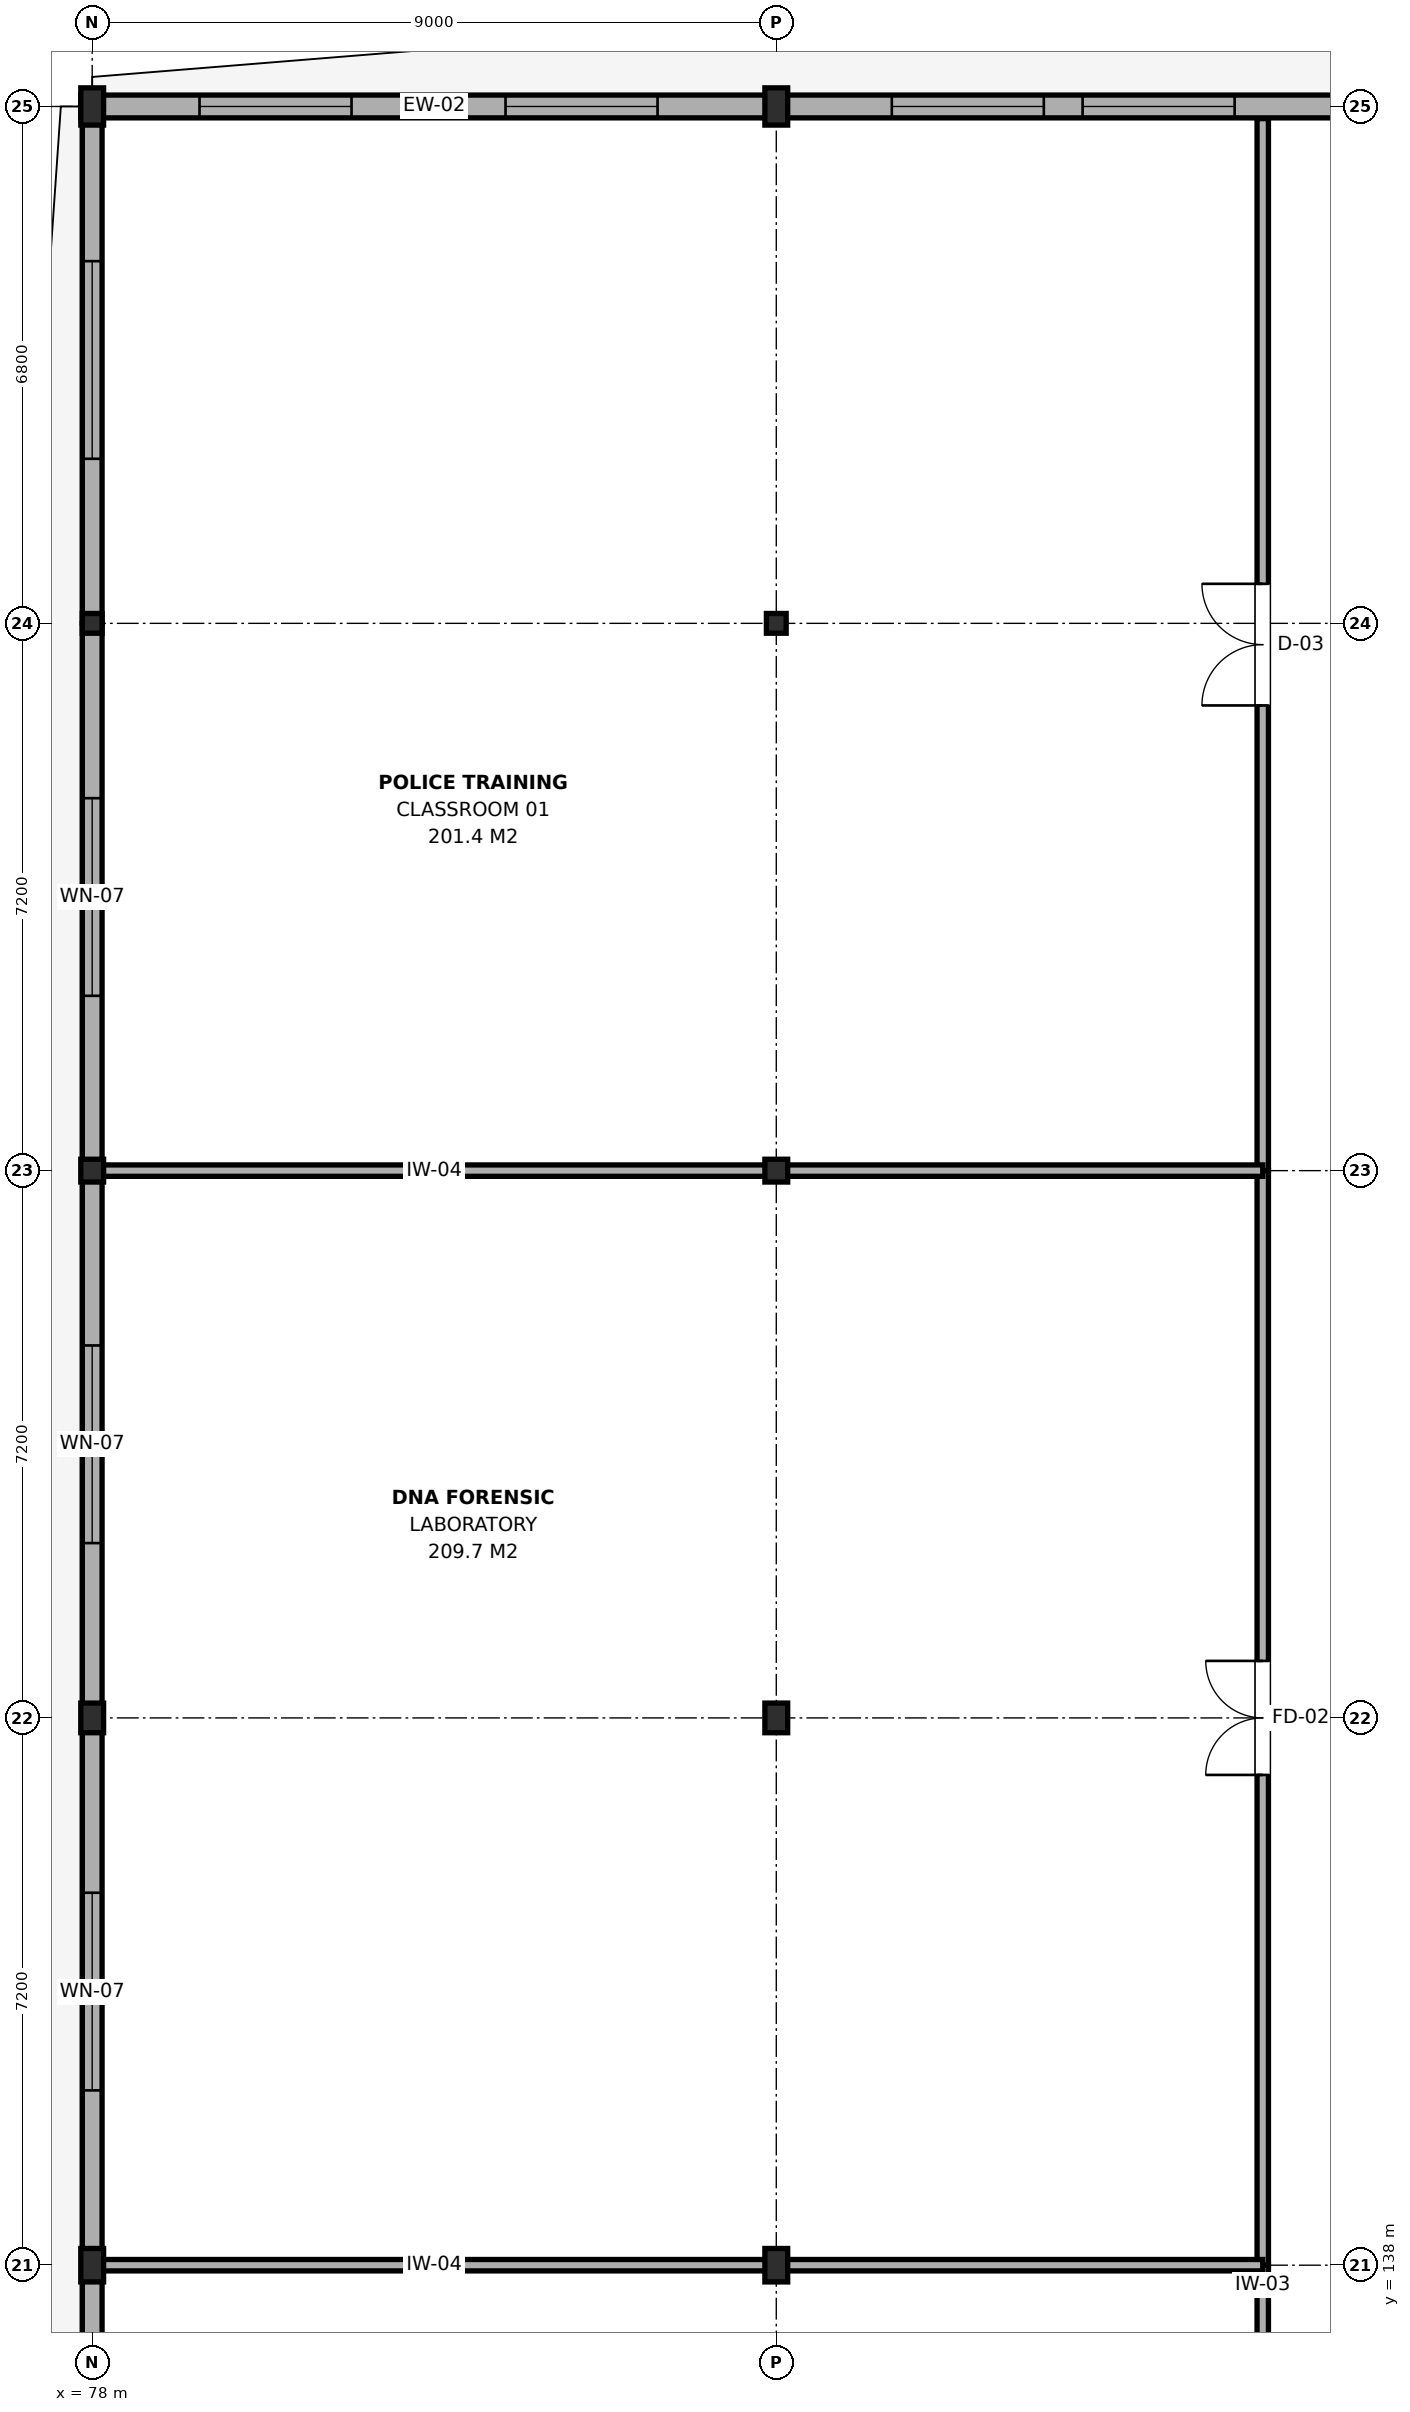
"""IFC4 building model, lengths in metres.
Left out: names, types, materials, properties, quantities, classifications, styles, units other than length and angle.
Written with IfcOpenShell. Run it as: python <this file> out.ifc"""

import sys

from ifc_helpers import new_model, si_unit, direction, frame, frame_2d, origin, origin_2d, place, context, subcontext, project, spatial, rectangle, i_section, extrude, element, fill, save


model = new_model("IFC4")
c1 = context("Model", 3, precision=1e-05, world=origin(), true_north=direction((0.0, 1.0)))
c2 = subcontext(c1, "Body", "Model", "MODEL_VIEW")
j1 = project(units=[si_unit("LENGTHUNIT", "METRE"), si_unit("PLANEANGLEUNIT", "RADIAN")], contexts=[c1])
p1 = place(None, origin())
s1 = spatial("IfcSite", under=j1, at=p1, CompositionType="ELEMENT")
p2 = place(p1, origin())
s2 = spatial("IfcBuilding", under=s1, at=p2, CompositionType="ELEMENT")
p3 = place(p2, frame((0.0, 0.0, 13.2)))
s3 = spatial("IfcBuildingStorey", under=s2, at=p3, CompositionType="ELEMENT", Elevation=13.2)
p4 = place(p3, frame((78.0, 138.0, 0.0), z_axis=(0.0, 0.0, 1.0), x_axis=(1.0, 0.0, 0.0)))
e1 = element("IfcColumn", 1, at=p4, inside=s3, PredefinedType="COLUMN", context=c2, shape_type="SweptSolid", body=[
    extrude(i_section(OverallWidth=0.3, OverallDepth=0.44, WebThickness=0.011, FlangeThickness=0.021, FilletRadius=0.027, at=origin_2d()), origin(), (0.0, 0.0, 1.0), 3.9),
])
p5 = place(p3, frame((78.0, 145.2, 0.0), z_axis=(0.0, 0.0, 1.0), x_axis=(1.0, 0.0, 0.0)))
e2 = element("IfcColumn", 2, at=p5, inside=s3, PredefinedType="COLUMN", context=c2, shape_type="SweptSolid", body=[
    extrude(i_section(OverallWidth=0.3, OverallDepth=0.39, WebThickness=0.011, FlangeThickness=0.019, FilletRadius=0.027, at=origin_2d()), origin(), (0.0, 0.0, 1.0), 3.9),
])
p6 = place(p3, frame((78.0, 152.4, 0.0), z_axis=(0.0, 0.0, 1.0), x_axis=(1.0, 0.0, 0.0)))
e3 = element("IfcColumn", 3, at=p6, inside=s3, PredefinedType="COLUMN", context=c2, shape_type="SweptSolid", body=[
    extrude(i_section(OverallWidth=0.3, OverallDepth=0.3, WebThickness=0.011, FlangeThickness=0.019, FilletRadius=0.027, at=origin_2d()), origin(), (0.0, 0.0, 1.0), 3.9),
])
p7 = place(p3, frame((78.0, 159.6, 0.0), z_axis=(0.0, 0.0, 1.0), x_axis=(1.0, 0.0, 0.0)))
e4 = element("IfcColumn", 4, at=p7, inside=s3, PredefinedType="COLUMN", context=c2, shape_type="SweptSolid", body=[
    extrude(i_section(OverallWidth=0.26, OverallDepth=0.26, WebThickness=0.01, FlangeThickness=0.018, FilletRadius=0.024, at=origin_2d()), origin(), (0.0, 0.0, 1.0), 3.9),
])
p8 = place(p3, frame((78.0, 166.4, 0.0), z_axis=(0.0, 0.0, 1.0), x_axis=(1.0, 0.0, 0.0)))
e5 = element("IfcColumn", 5, at=p8, inside=s3, PredefinedType="COLUMN", context=c2, shape_type="SweptSolid", body=[
    extrude(i_section(OverallWidth=0.3, OverallDepth=0.49, WebThickness=0.012, FlangeThickness=0.023, FilletRadius=0.027, at=origin_2d()), origin(), (0.0, 0.0, 1.0), 3.9),
])
p9 = place(p3, frame((87.0, 138.0, 0.0), z_axis=(0.0, 0.0, 1.0), x_axis=(1.0, 0.0, 0.0)))
e6 = element("IfcColumn", 6, at=p9, inside=s3, PredefinedType="COLUMN", context=c2, shape_type="SweptSolid", body=[
    extrude(i_section(OverallWidth=0.3, OverallDepth=0.44, WebThickness=0.011, FlangeThickness=0.021, FilletRadius=0.027, at=origin_2d()), origin(), (0.0, 0.0, 1.0), 3.9),
])
p10 = place(p3, frame((87.0, 145.2, 0.0), z_axis=(0.0, 0.0, 1.0), x_axis=(1.0, 0.0, 0.0)))
e7 = element("IfcColumn", 7, at=p10, inside=s3, PredefinedType="COLUMN", context=c2, shape_type="SweptSolid", body=[
    extrude(i_section(OverallWidth=0.3, OverallDepth=0.39, WebThickness=0.011, FlangeThickness=0.019, FilletRadius=0.027, at=origin_2d()), origin(), (0.0, 0.0, 1.0), 3.9),
])
p11 = place(p3, frame((87.0, 152.4, 0.0), z_axis=(0.0, 0.0, 1.0), x_axis=(1.0, 0.0, 0.0)))
e8 = element("IfcColumn", 8, at=p11, inside=s3, PredefinedType="COLUMN", context=c2, shape_type="SweptSolid", body=[
    extrude(i_section(OverallWidth=0.3, OverallDepth=0.3, WebThickness=0.011, FlangeThickness=0.019, FilletRadius=0.027, at=origin_2d()), origin(), (0.0, 0.0, 1.0), 3.9),
])
p12 = place(p3, frame((87.0, 159.6, 0.0), z_axis=(0.0, 0.0, 1.0), x_axis=(1.0, 0.0, 0.0)))
e9 = element("IfcColumn", 9, at=p12, inside=s3, PredefinedType="COLUMN", context=c2, shape_type="SweptSolid", body=[
    extrude(i_section(OverallWidth=0.26, OverallDepth=0.26, WebThickness=0.01, FlangeThickness=0.018, FilletRadius=0.024, at=origin_2d()), origin(), (0.0, 0.0, 1.0), 3.9),
])
p13 = place(p3, frame((87.0, 166.4, 0.0), z_axis=(0.0, 0.0, 1.0), x_axis=(1.0, 0.0, 0.0)))
e10 = element("IfcColumn", 10, at=p13, inside=s3, PredefinedType="COLUMN", context=c2, shape_type="SweptSolid", body=[
    extrude(i_section(OverallWidth=0.3, OverallDepth=0.49, WebThickness=0.012, FlangeThickness=0.023, FilletRadius=0.027, at=origin_2d()), origin(), (0.0, 0.0, 1.0), 3.9),
])
p14 = place(p3, frame((78.0, 130.8, 0.0), z_axis=(0.0, 0.0, 1.0), x_axis=(0.0, 1.0, 0.0)))
e11 = element("IfcWall", 11, at=p14, inside=s3, PredefinedType="SOLIDWALL", context=c2, shape_type="SweptSolid", body=[
    extrude(rectangle(XDim=7.2, YDim=0.26, at=frame_2d((3.6, 0.0))), origin(), (0.0, 0.0, 1.0), 3.095),
])
p15 = place(p14, frame((2.3, 0.0, 1.05)))
e12 = element("IfcOpeningElement", 12, at=p15, cuts=e11, PredefinedType="OPENING", context=c2, shape_type="SweptSolid", body=[
    extrude(rectangle(XDim=2.6, YDim=1.5, at=frame_2d((1.3, 0.75))), frame((0.0, 0.145, 0.0), z_axis=(0.0, -1.0, 0.0), x_axis=(1.0, 0.0, 0.0)), (0.0, 0.0, 1.0), 0.29),
])
p16 = place(p3, frame((78.0, 138.0, 0.0), z_axis=(0.0, 0.0, 1.0), x_axis=(0.0, 1.0, 0.0)))
e13 = element("IfcWall", 13, at=p16, inside=s3, PredefinedType="SOLIDWALL", context=c2, shape_type="SweptSolid", body=[
    extrude(rectangle(XDim=7.2, YDim=0.26, at=frame_2d((3.6, 0.0))), origin(), (0.0, 0.0, 1.0), 3.095),
])
p17 = place(p16, frame((2.3, 0.0, 1.05)))
e14 = element("IfcOpeningElement", 14, at=p17, cuts=e13, PredefinedType="OPENING", context=c2, shape_type="SweptSolid", body=[
    extrude(rectangle(XDim=2.6, YDim=1.5, at=frame_2d((1.3, 0.75))), frame((0.0, 0.145, 0.0), z_axis=(0.0, -1.0, 0.0), x_axis=(1.0, 0.0, 0.0)), (0.0, 0.0, 1.0), 0.29),
])
p18 = place(p3, frame((78.0, 145.2, 0.0), z_axis=(0.0, 0.0, 1.0), x_axis=(0.0, 1.0, 0.0)))
e15 = element("IfcWall", 15, at=p18, inside=s3, PredefinedType="SOLIDWALL", context=c2, shape_type="SweptSolid", body=[
    extrude(rectangle(XDim=7.2, YDim=0.26, at=frame_2d((3.6, 0.0))), origin(), (0.0, 0.0, 1.0), 3.145),
])
p19 = place(p18, frame((2.3, 0.0, 1.05)))
e16 = element("IfcOpeningElement", 16, at=p19, cuts=e15, PredefinedType="OPENING", context=c2, shape_type="SweptSolid", body=[
    extrude(rectangle(XDim=2.6, YDim=1.5, at=frame_2d((1.3, 0.75))), frame((0.0, 0.145, 0.0), z_axis=(0.0, -1.0, 0.0), x_axis=(1.0, 0.0, 0.0)), (0.0, 0.0, 1.0), 0.29),
])
p20 = place(p3, frame((78.0, 152.4, 0.0), z_axis=(0.0, 0.0, 1.0), x_axis=(0.0, 1.0, 0.0)))
e17 = element("IfcWall", 17, at=p20, inside=s3, PredefinedType="SOLIDWALL", context=c2, shape_type="SweptSolid", body=[
    extrude(rectangle(XDim=7.2, YDim=0.26, at=frame_2d((3.6, 0.0))), origin(), (0.0, 0.0, 1.0), 3.195),
])
p21 = place(p20, frame((2.3, 0.0, 1.05)))
e18 = element("IfcOpeningElement", 18, at=p21, cuts=e17, PredefinedType="OPENING", context=c2, shape_type="SweptSolid", body=[
    extrude(rectangle(XDim=2.6, YDim=1.5, at=frame_2d((1.3, 0.75))), frame((0.0, 0.145, 0.0), z_axis=(0.0, -1.0, 0.0), x_axis=(1.0, 0.0, 0.0)), (0.0, 0.0, 1.0), 0.29),
])
p22 = place(p3, frame((78.0, 159.6, 0.0), z_axis=(0.0, 0.0, 1.0), x_axis=(0.0, 1.0, 0.0)))
e19 = element("IfcWall", 19, at=p22, inside=s3, PredefinedType="SOLIDWALL", context=c2, shape_type="SweptSolid", body=[
    extrude(rectangle(XDim=6.93, YDim=0.26, at=frame_2d((3.465, 0.0))), origin(), (0.0, 0.0, 1.0), 3.245),
])
p23 = place(p22, frame((2.165, 0.0, 1.05)))
e20 = element("IfcOpeningElement", 20, at=p23, cuts=e19, PredefinedType="OPENING", context=c2, shape_type="SweptSolid", body=[
    extrude(rectangle(XDim=2.6, YDim=1.5, at=frame_2d((1.3, 0.75))), frame((0.0, 0.145, 0.0), z_axis=(0.0, -1.0, 0.0), x_axis=(1.0, 0.0, 0.0)), (0.0, 0.0, 1.0), 0.29),
])
p24 = place(p3, frame((77.85, 166.4, 0.0), z_axis=(0.0, 0.0, 1.0), x_axis=(1.0, 0.0, 0.0)))
e21 = element("IfcWall", 21, at=p24, inside=s3, PredefinedType="SOLIDWALL", context=c2, shape_type="SweptSolid", body=[
    extrude(rectangle(XDim=9.15, YDim=0.3, at=frame_2d((4.575, 0.0))), origin(), (0.0, 0.0, 1.0), 3.105),
])
p25 = place(p24, frame((1.562, 0.0, 0.65)))
e22 = element("IfcOpeningElement", 22, at=p25, cuts=e21, PredefinedType="OPENING", context=c2, shape_type="SweptSolid", body=[
    extrude(rectangle(XDim=2.0, YDim=1.8, at=frame_2d((1.0, 0.9))), frame((0.0, 0.165, 0.0), z_axis=(0.0, -1.0, 0.0), x_axis=(1.0, 0.0, 0.0)), (0.0, 0.0, 1.0), 0.33),
])
p26 = place(p24, frame((5.588, 0.0, 0.65)))
e23 = element("IfcOpeningElement", 23, at=p26, cuts=e21, PredefinedType="OPENING", context=c2, shape_type="SweptSolid", body=[
    extrude(rectangle(XDim=2.0, YDim=1.8, at=frame_2d((1.0, 0.9))), frame((0.0, 0.165, 0.0), z_axis=(0.0, -1.0, 0.0), x_axis=(1.0, 0.0, 0.0)), (0.0, 0.0, 1.0), 0.33),
])
p27 = place(p3, frame((87.0, 166.4, 0.0), z_axis=(0.0, 0.0, 1.0), x_axis=(1.0, 0.0, 0.0)))
e24 = element("IfcWall", 24, at=p27, inside=s3, PredefinedType="SOLIDWALL", context=c2, shape_type="SweptSolid", body=[
    extrude(rectangle(XDim=9.0, YDim=0.3, at=frame_2d((4.5, 0.0))), origin(), (0.0, 0.0, 1.0), 3.105),
])
p28 = place(p27, frame((1.52, 0.0, 0.65)))
e25 = element("IfcOpeningElement", 25, at=p28, cuts=e24, PredefinedType="OPENING", context=c2, shape_type="SweptSolid", body=[
    extrude(rectangle(XDim=2.0, YDim=1.8, at=frame_2d((1.0, 0.9))), frame((0.0, 0.165, 0.0), z_axis=(0.0, -1.0, 0.0), x_axis=(1.0, 0.0, 0.0)), (0.0, 0.0, 1.0), 0.33),
])
p29 = place(p27, frame((4.03, 0.0, 0.65)))
e26 = element("IfcOpeningElement", 26, at=p29, cuts=e24, PredefinedType="OPENING", context=c2, shape_type="SweptSolid", body=[
    extrude(rectangle(XDim=2.0, YDim=1.8, at=frame_2d((1.0, 0.9))), frame((0.0, 0.165, 0.0), z_axis=(0.0, -1.0, 0.0), x_axis=(1.0, 0.0, 0.0)), (0.0, 0.0, 1.0), 0.33),
])
p30 = place(p3, frame((93.4, 122.56, 0.0), z_axis=(0.0, 0.0, 1.0), x_axis=(0.0, 1.0, 0.0)))
e27 = element("IfcWall", 27, at=p30, inside=s3, PredefinedType="PARTITIONING", context=c2, shape_type="SweptSolid", body=[
    extrude(rectangle(XDim=15.44, YDim=0.15, at=frame_2d((7.72, 0.0))), origin(), (0.0, 0.0, 1.0), 3.205),
])
p31 = place(p30, frame((6.97, 0.0, 0.0)))
e28 = element("IfcOpeningElement", 28, at=p31, cuts=e27, PredefinedType="OPENING", context=c2, shape_type="SweptSolid", body=[
    extrude(rectangle(XDim=1.5, YDim=2.15, at=frame_2d((0.75, 1.075))), frame((0.0, 0.09, 0.0), z_axis=(0.0, -1.0, 0.0), x_axis=(1.0, 0.0, 0.0)), (0.0, 0.0, 1.0), 0.18),
])
p32 = place(p30, frame((9.817, 0.0, 0.95)))
e29 = element("IfcOpeningElement", 29, at=p32, cuts=e27, PredefinedType="OPENING", context=c2, shape_type="SweptSolid", body=[
    extrude(rectangle(XDim=2.6, YDim=1.5, at=frame_2d((1.3, 0.75))), frame((0.0, 0.09, 0.0), z_axis=(0.0, -1.0, 0.0), x_axis=(1.0, 0.0, 0.0)), (0.0, 0.0, 1.0), 0.18),
])
p33 = place(p3, frame((93.4, 138.0, 0.0), z_axis=(0.0, 0.0, 1.0), x_axis=(0.0, 1.0, 0.0)))
e30 = element("IfcWall", 30, at=p33, inside=s3, PredefinedType="PARTITIONING", context=c2, shape_type="SweptSolid", body=[
    extrude(rectangle(XDim=14.4, YDim=0.15, at=frame_2d((7.2, 0.0))), origin(), (0.0, 0.0, 1.0), 3.105),
])
p34 = place(p33, frame((6.45, 0.0, 0.0)))
e31 = element("IfcOpeningElement", 31, at=p34, cuts=e30, PredefinedType="OPENING", context=c2, shape_type="SweptSolid", body=[
    extrude(rectangle(XDim=1.5, YDim=2.15, at=frame_2d((0.75, 1.075))), frame((0.0, 0.09, 0.0), z_axis=(0.0, -1.0, 0.0), x_axis=(1.0, 0.0, 0.0)), (0.0, 0.0, 1.0), 0.18),
])
p35 = place(p3, frame((78.14, 138.0, 0.0), z_axis=(0.0, 0.0, 1.0), x_axis=(1.0, 0.0, 0.0)))
e32 = element("IfcWall", 32, at=p35, inside=s3, PredefinedType="PARTITIONING", context=c2, shape_type="SweptSolid", body=[
    extrude(rectangle(XDim=15.26, YDim=0.15, at=frame_2d((7.63, 0.0))), origin(), (0.0, 0.0, 1.0), 3.155),
])
p36 = place(p3, frame((93.4, 152.4, 0.0), z_axis=(0.0, 0.0, 1.0), x_axis=(0.0, 1.0, 0.0)))
e33 = element("IfcWall", 33, at=p36, inside=s3, PredefinedType="PARTITIONING", context=c2, shape_type="SweptSolid", body=[
    extrude(rectangle(XDim=13.84, YDim=0.15, at=frame_2d((6.92, 0.0))), origin(), (0.0, 0.0, 1.0), 3.105),
])
p37 = place(p36, frame((6.12, 0.0, 0.0)))
e34 = element("IfcOpeningElement", 34, at=p37, cuts=e33, PredefinedType="OPENING", context=c2, shape_type="SweptSolid", body=[
    extrude(rectangle(XDim=1.6, YDim=2.15, at=frame_2d((0.8, 1.075))), frame((0.0, 0.09, 0.0), z_axis=(0.0, -1.0, 0.0), x_axis=(1.0, 0.0, 0.0)), (0.0, 0.0, 1.0), 0.18),
])
p38 = place(p3, frame((78.14, 152.4, 0.0), z_axis=(0.0, 0.0, 1.0), x_axis=(1.0, 0.0, 0.0)))
e35 = element("IfcWall", 35, at=p38, inside=s3, PredefinedType="PARTITIONING", context=c2, shape_type="SweptSolid", body=[
    extrude(rectangle(XDim=15.26, YDim=0.15, at=frame_2d((7.63, 0.0))), origin(), (0.0, 0.0, 1.0), 3.195),
])
p39 = place(p17, origin())
e36 = element("IfcWindow", 36, at=p39, inside=s3, PartitioningType="SINGLE_PANEL", PredefinedType="WINDOW", context=c2, shape_type="SweptSolid", body=[
    extrude(rectangle(XDim=2.6, YDim=1.5, at=frame_2d((1.3, 0.75))), frame((0.0, 0.03, 0.0), z_axis=(0.0, -1.0, 0.0), x_axis=(1.0, 0.0, 0.0)), (0.0, 0.0, 1.0), 0.06),
])
fill(e14, e36)
p40 = place(p19, origin())
e37 = element("IfcWindow", 37, at=p40, inside=s3, PartitioningType="SINGLE_PANEL", PredefinedType="WINDOW", context=c2, shape_type="SweptSolid", body=[
    extrude(rectangle(XDim=2.6, YDim=1.5, at=frame_2d((1.3, 0.75))), frame((0.0, 0.03, 0.0), z_axis=(0.0, -1.0, 0.0), x_axis=(1.0, 0.0, 0.0)), (0.0, 0.0, 1.0), 0.06),
])
fill(e16, e37)
p41 = place(p21, origin())
e38 = element("IfcWindow", 38, at=p41, inside=s3, PartitioningType="SINGLE_PANEL", PredefinedType="WINDOW", context=c2, shape_type="SweptSolid", body=[
    extrude(rectangle(XDim=2.6, YDim=1.5, at=frame_2d((1.3, 0.75))), frame((0.0, 0.03, 0.0), z_axis=(0.0, -1.0, 0.0), x_axis=(1.0, 0.0, 0.0)), (0.0, 0.0, 1.0), 0.06),
])
fill(e18, e38)
p42 = place(p23, origin())
e39 = element("IfcWindow", 39, at=p42, inside=s3, PartitioningType="SINGLE_PANEL", PredefinedType="WINDOW", context=c2, shape_type="SweptSolid", body=[
    extrude(rectangle(XDim=2.6, YDim=1.5, at=frame_2d((1.3, 0.75))), frame((0.0, 0.03, 0.0), z_axis=(0.0, -1.0, 0.0), x_axis=(1.0, 0.0, 0.0)), (0.0, 0.0, 1.0), 0.06),
])
fill(e20, e39)
p43 = place(p25, origin())
e40 = element("IfcWindow", 40, at=p43, inside=s3, PartitioningType="SINGLE_PANEL", PredefinedType="WINDOW", context=c2, shape_type="SweptSolid", body=[
    extrude(rectangle(XDim=2.0, YDim=1.8, at=frame_2d((1.0, 0.9))), frame((0.0, 0.03, 0.0), z_axis=(0.0, -1.0, 0.0), x_axis=(1.0, 0.0, 0.0)), (0.0, 0.0, 1.0), 0.06),
])
fill(e22, e40)
p44 = place(p26, origin())
e41 = element("IfcWindow", 41, at=p44, inside=s3, PartitioningType="SINGLE_PANEL", PredefinedType="WINDOW", context=c2, shape_type="SweptSolid", body=[
    extrude(rectangle(XDim=2.0, YDim=1.8, at=frame_2d((1.0, 0.9))), frame((0.0, 0.03, 0.0), z_axis=(0.0, -1.0, 0.0), x_axis=(1.0, 0.0, 0.0)), (0.0, 0.0, 1.0), 0.06),
])
fill(e23, e41)
p45 = place(p28, origin())
e42 = element("IfcWindow", 42, at=p45, inside=s3, PartitioningType="SINGLE_PANEL", PredefinedType="WINDOW", context=c2, shape_type="SweptSolid", body=[
    extrude(rectangle(XDim=2.0, YDim=1.8, at=frame_2d((1.0, 0.9))), frame((0.0, 0.03, 0.0), z_axis=(0.0, -1.0, 0.0), x_axis=(1.0, 0.0, 0.0)), (0.0, 0.0, 1.0), 0.06),
])
fill(e25, e42)
p46 = place(p29, origin())
e43 = element("IfcWindow", 43, at=p46, inside=s3, PartitioningType="SINGLE_PANEL", PredefinedType="WINDOW", context=c2, shape_type="SweptSolid", body=[
    extrude(rectangle(XDim=2.0, YDim=1.8, at=frame_2d((1.0, 0.9))), frame((0.0, 0.03, 0.0), z_axis=(0.0, -1.0, 0.0), x_axis=(1.0, 0.0, 0.0)), (0.0, 0.0, 1.0), 0.06),
])
fill(e26, e43)
p47 = place(p34, origin())
e44 = element("IfcDoor", 44, at=p47, inside=s3, OperationType="DOUBLE_DOOR_SINGLE_SWING", PredefinedType="DOOR", context=c2, shape_type="SweptSolid", body=[
    extrude(rectangle(XDim=1.5, YDim=2.15, at=frame_2d((0.75, 1.075))), frame((0.0, 0.025, 0.0), z_axis=(0.0, -1.0, 0.0), x_axis=(1.0, 0.0, 0.0)), (0.0, 0.0, 1.0), 0.05),
])
fill(e31, e44)
p48 = place(p37, origin())
e45 = element("IfcDoor", 45, at=p48, inside=s3, OperationType="DOUBLE_DOOR_SINGLE_SWING", PredefinedType="DOOR", context=c2, shape_type="SweptSolid", body=[
    extrude(rectangle(XDim=1.6, YDim=2.15, at=frame_2d((0.8, 1.075))), frame((0.0, 0.025, 0.0), z_axis=(0.0, -1.0, 0.0), x_axis=(1.0, 0.0, 0.0)), (0.0, 0.0, 1.0), 0.05),
])
fill(e34, e45)
save(model, sys.argv[1])
